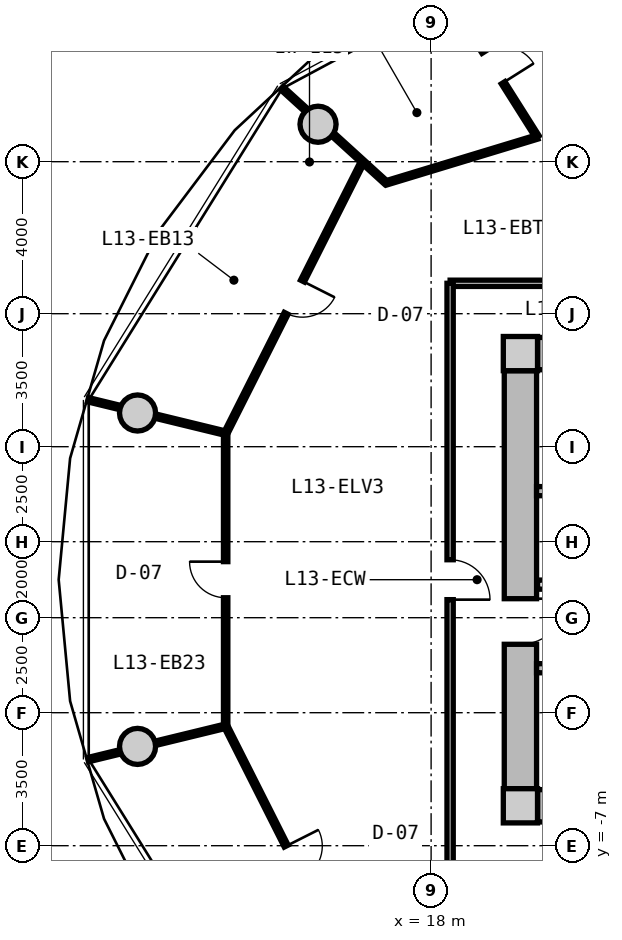
"""IFC4 building model, lengths in metres.
Left out: names, types, materials, properties, quantities, classifications, styles, units other than length and angle.
Written with IfcOpenShell. Run it as: python <this file> out.ifc"""

import sys

from ifc_helpers import new_model, si_unit, direction, frame, frame_2d, origin, origin_2d, place, context, subcontext, project, spatial, rectangle, circle, extrude, source, transform, mapped, element, fill, save


model = new_model("IFC4")
c1 = context("Model", 3, precision=1e-05, world=origin(), true_north=direction((0.0, 1.0)))
c2 = subcontext(c1, "Body", "Model", "MODEL_VIEW")
j1 = project(units=[si_unit("LENGTHUNIT", "METRE"), si_unit("PLANEANGLEUNIT", "RADIAN")], contexts=[c1])
p1 = place(None, origin())
s1 = spatial("IfcSite", under=j1, at=p1, CompositionType="ELEMENT")
p2 = place(p1, origin())
s2 = spatial("IfcBuilding", under=s1, at=p2, CompositionType="ELEMENT")
p3 = place(p2, frame((0.0, 0.0, 46.0)))
s3 = spatial("IfcBuildingStorey", under=s2, at=p3, CompositionType="ELEMENT", Elevation=46.0)
m1 = source(origin(), c2, "Body", "SweptSolid", [
    extrude(rectangle(XDim=0.9, YDim=0.9, at=origin_2d()), origin(), (0.0, 0.0, 1.0), 3.05),
])
for number, where, z_axis, x_axis in (
    (1, (20.35, -5.95, 0.0), (0.0, 0.0, 1.0), (1.0, 0.0, 0.0)),
    (2, (20.35, 5.95, 0.0), (0.0, 0.0, 1.0), (1.0, 0.0, 0.0)),
):
    element("IfcColumn", number, at=place(p3, frame(where, z_axis=z_axis, x_axis=x_axis)), inside=s3, PredefinedType="COLUMN", context=c2, shape_type="MappedRepresentation", body=[
        mapped(m1, transform((0.0, 0.0, 0.0), x_axis=(1.0, 0.0, 0.0), y_axis=(0.0, 1.0, 0.0), z_axis=(0.0, 0.0, 1.0), scale=1.0)),
    ])
m2 = source(origin(), c2, "Body", "SweptSolid", [
    extrude(rectangle(XDim=14.4, YDim=0.85, at=frame_2d((7.2, 0.0))), origin(), (0.0, 0.0, 1.0), 2.79),
])
for number, where, z_axis, x_axis in (
    (3, (20.8, 5.95, 0.0), (0.0, 0.0, 1.0), (1.0, 0.0, 0.0)),
    (4, (35.2, -5.95, 0.0), (0.0, 0.0, 1.0), (-1.0, 0.0, 0.0)),
):
    element("IfcWall", number, at=place(p3, frame(where, z_axis=z_axis, x_axis=x_axis)), inside=s3, PredefinedType="SHEAR", context=c2, shape_type="MappedRepresentation", body=[
        mapped(m2, transform((0.0, 0.0, 0.0), x_axis=(1.0, 0.0, 0.0), y_axis=(0.0, 1.0, 0.0), z_axis=(0.0, 0.0, 1.0), scale=1.0)),
    ])
m3 = source(origin(), c2, "Body", "SweptSolid", [
    extrude(rectangle(XDim=11.0, YDim=0.85, at=frame_2d((5.5, 0.0))), origin(), (0.0, 0.0, 1.0), 2.79),
])
p4 = place(p3, frame((20.35, -5.5, 0.0), z_axis=(0.0, 0.0, 1.0), x_axis=(0.0, 1.0, 0.0)))
e5 = element("IfcWall", 5, at=p4, inside=s3, PredefinedType="SHEAR", context=c2, shape_type="MappedRepresentation", body=[
    mapped(m3, transform((0.0, 0.0, 0.0), x_axis=(1.0, 0.0, 0.0), y_axis=(0.0, 1.0, 0.0), z_axis=(0.0, 0.0, 1.0), scale=1.0)),
])
p5 = place(p4, frame((3.8, 0.0, 0.0)))
e6 = element("IfcOpeningElement", 6, at=p5, cuts=e5, PredefinedType="OPENING", context=c2, shape_type="SweptSolid", body=[
    extrude(rectangle(XDim=1.2, YDim=2.15, at=frame_2d((0.6, 1.075))), frame((0.0, 0.435, 0.0), z_axis=(0.0, -1.0, 0.0), x_axis=(1.0, 0.0, 0.0)), (0.0, 0.0, 1.0), 0.87),
])
m4 = source(origin(), c2, "Body", "SweptSolid", [
    extrude(circle(Radius=0.475, at=origin_2d()), origin(), (0.0, 0.0, 1.0), 3.05),
])
for number, where, z_axis, x_axis in (
    (7, (15.025, 11.985, 0.0), (0.0, 0.0, 1.0), (1.0, 0.0, 0.0)),
    (8, (10.275, 4.387, 0.0), (0.0, 0.0, 1.0), (1.0, 0.0, 0.0)),
    (9, (10.275, -4.387, 0.0), (0.0, 0.0, 1.0), (1.0, 0.0, 0.0)),
):
    element("IfcColumn", number, at=place(p3, frame(where, z_axis=z_axis, x_axis=x_axis)), inside=s3, PredefinedType="COLUMN", context=c2, shape_type="MappedRepresentation", body=[
        mapped(m4, transform((0.0, 0.0, 0.0), x_axis=(1.0, 0.0, 0.0), y_axis=(0.0, 1.0, 0.0), z_axis=(0.0, 0.0, 1.0), scale=1.0)),
    ])
m5 = source(origin(), c2, "Body", "SweptSolid", [
    extrude(rectangle(XDim=7.765, YDim=0.24, at=frame_2d((3.883, 0.0))), origin(), (0.0, 0.0, 1.0), 2.79),
])
p6 = place(p3, frame((20.775, 2.33, 0.0), z_axis=(0.0, 0.0, 1.0), x_axis=(1.0, 0.0, 0.0)))
e10 = element("IfcWall", 10, at=p6, inside=s3, PredefinedType="PARTITIONING", context=c2, shape_type="MappedRepresentation", body=[
    mapped(m5, transform((0.0, 0.0, 0.0), x_axis=(1.0, 0.0, 0.0), y_axis=(0.0, 1.0, 0.0), z_axis=(0.0, 0.0, 1.0), scale=1.0)),
])
p7 = place(p3, frame((20.775, -2.33, 0.0), z_axis=(0.0, 0.0, 1.0), x_axis=(1.0, 0.0, 0.0)))
e11 = element("IfcWall", 11, at=p7, inside=s3, PredefinedType="PARTITIONING", context=c2, shape_type="MappedRepresentation", body=[
    mapped(m5, transform((0.0, 0.0, 0.0), x_axis=(1.0, 0.0, 0.0), y_axis=(0.0, 1.0, 0.0), z_axis=(0.0, 0.0, 1.0), scale=1.0)),
])
p8 = place(p7, frame((0.885, 0.0, 0.0)))
e12 = element("IfcOpeningElement", 12, at=p8, cuts=e11, PredefinedType="OPENING", context=c2, shape_type="SweptSolid", body=[
    extrude(rectangle(XDim=1.1, YDim=2.15, at=frame_2d((0.55, 1.075))), frame((0.0, 0.13, 0.0), z_axis=(0.0, -1.0, 0.0), x_axis=(1.0, 0.0, 0.0)), (0.0, 0.0, 1.0), 0.26),
])
m6 = source(origin(), c2, "Body", "SweptSolid", [
    extrude(rectangle(XDim=7.62, YDim=0.24, at=frame_2d((3.81, 0.0))), origin(), (0.0, 0.0, 1.0), 2.775),
])
p9 = place(p3, frame((20.8, -0.13, 0.0), z_axis=(0.0, 0.0, 1.0), x_axis=(1.0, 0.0, 0.0)))
e13 = element("IfcWall", 13, at=p9, inside=s3, PredefinedType="PARTITIONING", context=c2, shape_type="MappedRepresentation", body=[
    mapped(m6, transform((0.0, 0.0, 0.0), x_axis=(1.0, 0.0, 0.0), y_axis=(0.0, 1.0, 0.0), z_axis=(0.0, 0.0, 1.0), scale=1.0)),
])
p10 = place(p9, frame((6.22, 0.0, 0.0)))
e14 = element("IfcOpeningElement", 14, at=p10, cuts=e13, PredefinedType="OPENING", context=c2, shape_type="SweptSolid", body=[
    extrude(rectangle(XDim=1.0, YDim=2.1, at=frame_2d((0.5, 1.05))), frame((0.0, 0.13, 0.0), z_axis=(0.0, -1.0, 0.0), x_axis=(1.0, 0.0, 0.0)), (0.0, 0.0, 1.0), 0.26),
])
p11 = place(p9, frame((0.85, 0.0, 0.0)))
e15 = element("IfcOpeningElement", 15, at=p11, cuts=e13, PredefinedType="OPENING", context=c2, shape_type="SweptSolid", body=[
    extrude(rectangle(XDim=1.1, YDim=2.2, at=frame_2d((0.55, 1.1))), frame((0.0, 0.13, 0.0), z_axis=(0.0, -1.0, 0.0), x_axis=(1.0, 0.0, 0.0)), (0.0, 0.0, 1.0), 0.26),
])
p12 = place(p9, frame((3.85, 0.0, 0.0)))
e16 = element("IfcOpeningElement", 16, at=p12, cuts=e13, PredefinedType="OPENING", context=c2, shape_type="SweptSolid", body=[
    extrude(rectangle(XDim=1.1, YDim=2.2, at=frame_2d((0.55, 1.1))), frame((0.0, 0.13, 0.0), z_axis=(0.0, -1.0, 0.0), x_axis=(1.0, 0.0, 0.0)), (0.0, 0.0, 1.0), 0.26),
])
m7 = source(origin(), c2, "Body", "SweptSolid", [
    extrude(rectangle(XDim=19.0, YDim=0.165, at=frame_2d((9.5, 0.0))), origin(), (0.0, 0.0, 1.0), 2.775),
])
p13 = place(p3, frame((18.5, 7.8, 0.0), z_axis=(0.0, 0.0, 1.0), x_axis=(1.0, 0.0, 0.0)))
e17 = element("IfcWall", 17, at=p13, inside=s3, PredefinedType="PARTITIONING", context=c2, shape_type="MappedRepresentation", body=[
    mapped(m7, transform((0.0, 0.0, 0.0), x_axis=(1.0, 0.0, 0.0), y_axis=(0.0, 1.0, 0.0), z_axis=(0.0, 0.0, 1.0), scale=1.0)),
])
p14 = place(p13, frame((12.462, 0.0, 0.0)))
e18 = element("IfcOpeningElement", 18, at=p14, cuts=e17, PredefinedType="OPENING", context=c2, shape_type="SweptSolid", body=[
    extrude(rectangle(XDim=1.05, YDim=2.15, at=frame_2d((0.525, 1.075))), frame((0.0, 0.093, 0.0), z_axis=(0.0, -1.0, 0.0), x_axis=(1.0, 0.0, 0.0)), (0.0, 0.0, 1.0), 0.185),
])
m8 = source(origin(), c2, "Body", "SweptSolid", [
    extrude(rectangle(XDim=15.6, YDim=0.165, at=frame_2d((7.8, 0.0))), origin(), (0.0, 0.0, 1.0), 2.775),
])
p15 = place(p3, frame((18.5, -7.8, 0.0), z_axis=(0.0, 0.0, 1.0), x_axis=(0.0, 1.0, 0.0)))
e19 = element("IfcWall", 19, at=p15, inside=s3, PredefinedType="PARTITIONING", context=c2, shape_type="MappedRepresentation", body=[
    mapped(m8, transform((0.0, 0.0, 0.0), x_axis=(1.0, 0.0, 0.0), y_axis=(0.0, 1.0, 0.0), z_axis=(0.0, 0.0, 1.0), scale=1.0)),
])
p16 = place(p15, frame((7.275, 0.0, 0.0)))
e20 = element("IfcOpeningElement", 20, at=p16, cuts=e19, PredefinedType="OPENING", context=c2, shape_type="SweptSolid", body=[
    extrude(rectangle(XDim=1.05, YDim=2.15, at=frame_2d((0.525, 1.075))), frame((0.0, 0.093, 0.0), z_axis=(0.0, -1.0, 0.0), x_axis=(1.0, 0.0, 0.0)), (0.0, 0.0, 1.0), 0.185),
])
m9 = source(origin(), c2, "Body", "SweptSolid", [
    extrude(rectangle(XDim=8.018, YDim=0.115, at=frame_2d((4.009, 0.0))), origin(), (0.0, 0.0, 1.0), 2.775),
])
p17 = place(p3, frame((16.205, 11.014, 0.0), z_axis=(0.0, 0.0, 1.0), x_axis=(-0.450134355233, -0.89296084026, 0.0)))
e21 = element("IfcWall", 21, at=p17, inside=s3, PredefinedType="PARTITIONING", context=c2, shape_type="MappedRepresentation", body=[
    mapped(m9, transform((0.0, 0.0, 0.0), x_axis=(1.0, 0.0, 0.0), y_axis=(0.0, 1.0, 0.0), z_axis=(0.0, 0.0, 1.0), scale=1.0)),
])
p18 = place(p17, frame((3.534, 0.0, 0.0)))
e22 = element("IfcOpeningElement", 22, at=p18, cuts=e21, PredefinedType="OPENING", context=c2, shape_type="SweptSolid", body=[
    extrude(rectangle(XDim=0.95, YDim=2.1, at=frame_2d((0.475, 1.05))), frame((0.0, 0.067, 0.0), z_axis=(0.0, -1.0, 0.0), x_axis=(1.0, 0.0, 0.0)), (0.0, 0.0, 1.0), 0.135),
])
m10 = source(origin(), c2, "Body", "SweptSolid", [
    extrude(rectangle(XDim=3.7, YDim=0.115, at=frame_2d((1.85, 0.0))), origin(), (0.0, 0.0, 1.0), 2.225),
])
p19 = place(p3, frame((16.808, 10.451, 0.0), z_axis=(0.0, 0.0, 1.0), x_axis=(-0.739922161065, 0.672692497033, 0.0)))
e23 = element("IfcWall", 23, at=p19, inside=s3, PredefinedType="PARTITIONING", context=c2, shape_type="MappedRepresentation", body=[
    mapped(m10, transform((0.0, 0.0, 0.0), x_axis=(1.0, 0.0, 0.0), y_axis=(0.0, 1.0, 0.0), z_axis=(0.0, 0.0, 1.0), scale=1.0)),
])
m11 = source(origin(), c2, "Body", "SweptSolid", [
    extrude(rectangle(XDim=7.709, YDim=0.115, at=frame_2d((3.855, 0.0))), origin(), (0.0, 0.0, 1.0), 2.775),
])
p20 = place(p3, frame((12.594, 3.855, 0.0), z_axis=(0.0, 0.0, 1.0), x_axis=(0.0, -1.0, 0.0)))
e24 = element("IfcWall", 24, at=p20, inside=s3, PredefinedType="PARTITIONING", context=c2, shape_type="MappedRepresentation", body=[
    mapped(m11, transform((0.0, 0.0, 0.0), x_axis=(1.0, 0.0, 0.0), y_axis=(0.0, 1.0, 0.0), z_axis=(0.0, 0.0, 1.0), scale=1.0)),
])
p21 = place(p20, frame((3.38, 0.0, 0.0)))
e25 = element("IfcOpeningElement", 25, at=p21, cuts=e24, PredefinedType="OPENING", context=c2, shape_type="SweptSolid", body=[
    extrude(rectangle(XDim=0.95, YDim=2.1, at=frame_2d((0.475, 1.05))), frame((0.0, 0.067, 0.0), z_axis=(0.0, -1.0, 0.0), x_axis=(1.0, 0.0, 0.0)), (0.0, 0.0, 1.0), 0.135),
])
m12 = source(origin(), c2, "Body", "SweptSolid", [
    extrude(rectangle(XDim=3.728, YDim=0.115, at=frame_2d((1.864, 0.0))), origin(), (0.0, 0.0, 1.0), 2.225),
])
p22 = place(p3, frame((12.594, 3.855, 0.0), z_axis=(0.0, 0.0, 1.0), x_axis=(-0.971641177968, 0.236460189624, 0.0)))
e26 = element("IfcWall", 26, at=p22, inside=s3, PredefinedType="PARTITIONING", context=c2, shape_type="MappedRepresentation", body=[
    mapped(m12, transform((0.0, 0.0, 0.0), x_axis=(1.0, 0.0, 0.0), y_axis=(0.0, 1.0, 0.0), z_axis=(0.0, 0.0, 1.0), scale=1.0)),
])
p23 = place(p3, frame((12.596, -3.854, 0.0), z_axis=(0.0, 0.0, 1.0), x_axis=(0.450134355233, -0.89296084026, 0.0)))
e27 = element("IfcWall", 27, at=p23, inside=s3, PredefinedType="PARTITIONING", context=c2, shape_type="MappedRepresentation", body=[
    mapped(m9, transform((0.0, 0.0, 0.0), x_axis=(1.0, 0.0, 0.0), y_axis=(0.0, 1.0, 0.0), z_axis=(0.0, 0.0, 1.0), scale=1.0)),
])
p24 = place(p23, frame((3.534, 0.0, 0.0)))
e28 = element("IfcOpeningElement", 28, at=p24, cuts=e27, PredefinedType="OPENING", context=c2, shape_type="SweptSolid", body=[
    extrude(rectangle(XDim=0.95, YDim=2.1, at=frame_2d((0.475, 1.05))), frame((0.0, 0.067, 0.0), z_axis=(0.0, -1.0, 0.0), x_axis=(1.0, 0.0, 0.0)), (0.0, 0.0, 1.0), 0.135),
])
m13 = source(origin(), c2, "Body", "SweptSolid", [
    extrude(rectangle(XDim=3.73, YDim=0.115, at=frame_2d((1.865, 0.0))), origin(), (0.0, 0.0, 1.0), 2.225),
])
p25 = place(p3, frame((12.596, -3.854, 0.0), z_axis=(0.0, 0.0, 1.0), x_axis=(-0.971644038568, -0.236448434791, 0.0)))
e29 = element("IfcWall", 29, at=p25, inside=s3, PredefinedType="PARTITIONING", context=c2, shape_type="MappedRepresentation", body=[
    mapped(m13, transform((0.0, 0.0, 0.0), x_axis=(1.0, 0.0, 0.0), y_axis=(0.0, 1.0, 0.0), z_axis=(0.0, 0.0, 1.0), scale=1.0)),
])
m14 = source(origin(), c2, "Body", "SweptSolid", [
    extrude(rectangle(XDim=4.326, YDim=0.115, at=frame_2d((2.163, 0.0))), origin(), (0.0, 0.0, 1.0), 2.775),
])
p26 = place(p3, frame((20.796, 11.651, 0.0), z_axis=(0.0, 0.0, 1.0), x_axis=(-0.534101263803, 0.845420510755, 0.0)))
e30 = element("IfcWall", 30, at=p26, inside=s3, PredefinedType="PARTITIONING", context=c2, shape_type="MappedRepresentation", body=[
    mapped(m14, transform((0.0, 0.0, 0.0), x_axis=(1.0, 0.0, 0.0), y_axis=(0.0, 1.0, 0.0), z_axis=(0.0, 0.0, 1.0), scale=1.0)),
])
p27 = place(p26, frame((1.688, 0.0, 0.0)))
e31 = element("IfcOpeningElement", 31, at=p27, cuts=e30, PredefinedType="OPENING", context=c2, shape_type="SweptSolid", body=[
    extrude(rectangle(XDim=0.95, YDim=2.1, at=frame_2d((0.475, 1.05))), frame((0.0, 0.067, 0.0), z_axis=(0.0, -1.0, 0.0), x_axis=(1.0, 0.0, 0.0)), (0.0, 0.0, 1.0), 0.135),
])
m15 = source(origin(), c2, "Body", "SweptSolid", [
    extrude(rectangle(XDim=4.159, YDim=0.115, at=frame_2d((2.079, 0.0))), origin(), (0.0, 0.0, 1.0), 2.415),
])
p28 = place(p3, frame((20.796, 11.651, 0.0), z_axis=(0.0, 0.0, 1.0), x_axis=(-0.956846477815, -0.290593905466, 0.0)))
e32 = element("IfcWall", 32, at=p28, inside=s3, PredefinedType="PARTITIONING", context=c2, shape_type="MappedRepresentation", body=[
    mapped(m15, transform((0.0, 0.0, 0.0), x_axis=(1.0, 0.0, 0.0), y_axis=(0.0, 1.0, 0.0), z_axis=(0.0, 0.0, 1.0), scale=1.0)),
])
m16 = source(origin(), c2, "Body", "SweptSolid", [
    extrude(rectangle(XDim=1.2, YDim=2.15, at=frame_2d((0.6, 1.075))), frame((0.0, 0.025, 0.0), z_axis=(0.0, -1.0, 0.0), x_axis=(1.0, 0.0, 0.0)), (0.0, 0.0, 1.0), 0.05),
])
p29 = place(p5, frame((1.2, 0.0, 0.0), z_axis=(0.0, 0.0, 1.0), x_axis=(-1.0, 0.0, 0.0)))
e33 = element("IfcDoor", 33, at=p29, inside=s3, OperationType="SINGLE_SWING_LEFT", PredefinedType="DOOR", context=c2, shape_type="MappedRepresentation", body=[
    mapped(m16, transform((0.0, 0.0, 0.0), x_axis=(1.0, 0.0, 0.0), y_axis=(0.0, 1.0, 0.0), z_axis=(0.0, 0.0, 1.0), scale=1.0)),
])
fill(e6, e33)
m17 = source(origin(), c2, "Body", "SweptSolid", [
    extrude(rectangle(XDim=1.05, YDim=2.15, at=frame_2d((0.525, 1.075))), frame((0.0, 0.025, 0.0), z_axis=(0.0, -1.0, 0.0), x_axis=(1.0, 0.0, 0.0)), (0.0, 0.0, 1.0), 0.05),
])
p30 = place(p16, frame((1.05, 0.0, 0.0), z_axis=(0.0, 0.0, 1.0), x_axis=(-1.0, 0.0, 0.0)))
e34 = element("IfcDoor", 34, at=p30, inside=s3, OperationType="SINGLE_SWING_RIGHT", PredefinedType="DOOR", context=c2, shape_type="MappedRepresentation", body=[
    mapped(m17, transform((0.0, 0.0, 0.0), x_axis=(1.0, 0.0, 0.0), y_axis=(0.0, 1.0, 0.0), z_axis=(0.0, 0.0, 1.0), scale=1.0)),
])
fill(e20, e34)
m18 = source(origin(), c2, "Body", "SweptSolid", [
    extrude(rectangle(XDim=0.95, YDim=2.1, at=frame_2d((0.475, 1.05))), frame((0.0, 0.025, 0.0), z_axis=(0.0, -1.0, 0.0), x_axis=(1.0, 0.0, 0.0)), (0.0, 0.0, 1.0), 0.05),
])
p31 = place(p27, frame((0.95, 0.0, 0.0), z_axis=(0.0, 0.0, 1.0), x_axis=(-1.0, 0.0, 0.0)))
e35 = element("IfcDoor", 35, at=p31, inside=s3, OperationType="SINGLE_SWING_RIGHT", PredefinedType="DOOR", context=c2, shape_type="MappedRepresentation", body=[
    mapped(m18, transform((0.0, 0.0, 0.0), x_axis=(1.0, 0.0, 0.0), y_axis=(0.0, 1.0, 0.0), z_axis=(0.0, 0.0, 1.0), scale=1.0)),
])
fill(e31, e35)
p32 = place(p18, origin())
e36 = element("IfcDoor", 36, at=p32, inside=s3, OperationType="SINGLE_SWING_LEFT", PredefinedType="DOOR", context=c2, shape_type="MappedRepresentation", body=[
    mapped(m18, transform((0.0, 0.0, 0.0), x_axis=(1.0, 0.0, 0.0), y_axis=(0.0, 1.0, 0.0), z_axis=(0.0, 0.0, 1.0), scale=1.0)),
])
fill(e22, e36)
p33 = place(p21, frame((0.95, 0.0, 0.0), z_axis=(0.0, 0.0, 1.0), x_axis=(-1.0, 0.0, 0.0)))
e37 = element("IfcDoor", 37, at=p33, inside=s3, OperationType="SINGLE_SWING_RIGHT", PredefinedType="DOOR", context=c2, shape_type="MappedRepresentation", body=[
    mapped(m18, transform((0.0, 0.0, 0.0), x_axis=(1.0, 0.0, 0.0), y_axis=(0.0, 1.0, 0.0), z_axis=(0.0, 0.0, 1.0), scale=1.0)),
])
fill(e25, e37)
p34 = place(p24, origin())
e38 = element("IfcDoor", 38, at=p34, inside=s3, OperationType="SINGLE_SWING_LEFT", PredefinedType="DOOR", context=c2, shape_type="MappedRepresentation", body=[
    mapped(m18, transform((0.0, 0.0, 0.0), x_axis=(1.0, 0.0, 0.0), y_axis=(0.0, 1.0, 0.0), z_axis=(0.0, 0.0, 1.0), scale=1.0)),
])
fill(e28, e38)
save(model, sys.argv[1])
